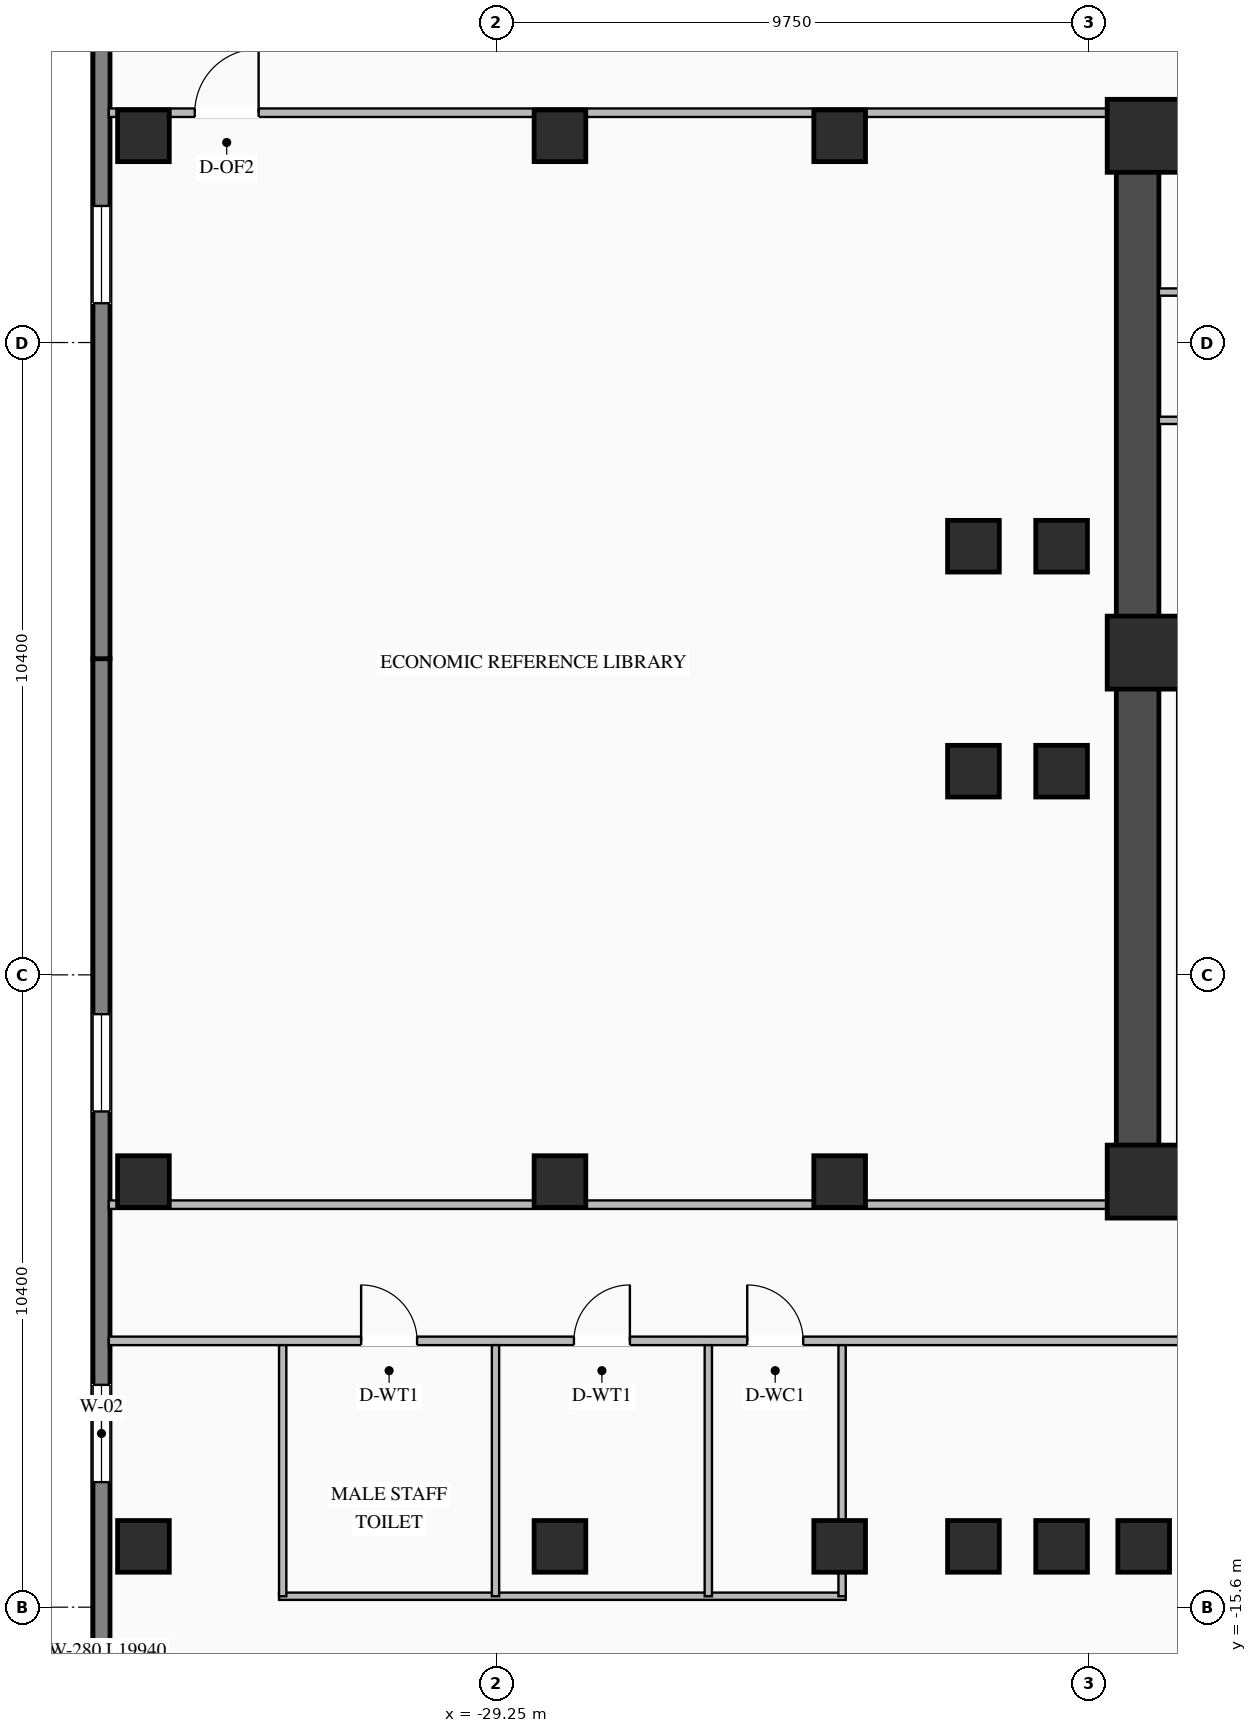
"""IFC4 building model, lengths in metres.
Left out: names, types, materials, properties, quantities, classifications, styles, units other than length and angle.
Written with IfcOpenShell. Run it as: python <this file> out.ifc"""

import sys

from ifc_helpers import new_model, si_unit, direction, frame, frame_2d, origin, origin_2d, place, context, subcontext, project, spatial, rectangle, i_section, extrude, element, fill, save


model = new_model("IFC4")
c1 = context("Model", 3, precision=1e-05, world=origin(), true_north=direction((0.0, 1.0)))
c2 = subcontext(c1, "Body", "Model", "MODEL_VIEW")
j1 = project(units=[si_unit("LENGTHUNIT", "METRE"), si_unit("PLANEANGLEUNIT", "RADIAN")], contexts=[c1])
p1 = place(None, origin())
s1 = spatial("IfcSite", under=j1, at=p1, CompositionType="ELEMENT")
p2 = place(p1, origin())
s2 = spatial("IfcBuilding", under=s1, at=p2, CompositionType="ELEMENT")
p3 = place(p2, frame((0.0, 0.0, 65.7)))
s3 = spatial("IfcBuildingStorey", under=s2, at=p3, CompositionType="ELEMENT", Elevation=65.7)
p4 = place(p3, frame((-19.05, -8.7, 0.0), z_axis=(0.0, 0.0, 1.0), x_axis=(1.0, 0.0, 0.0)))
e1 = element("IfcWall", 1, at=p4, inside=s3, PredefinedType="SHEAR", context=c2, shape_type="SweptSolid", body=[
    extrude(rectangle(XDim=10.25, YDim=0.7, at=frame_2d((5.125, 0.0))), origin(), (0.0, 0.0, 1.0), 4.02),
])
p5 = place(p3, frame((-19.05, 8.7, 0.0), z_axis=(0.0, 0.0, 1.0), x_axis=(1.0, 0.0, 0.0)))
e2 = element("IfcWall", 2, at=p5, inside=s3, PredefinedType="SHEAR", context=c2, shape_type="SweptSolid", body=[
    extrude(rectangle(XDim=10.25, YDim=0.7, at=frame_2d((5.125, 0.0))), origin(), (0.0, 0.0, 1.0), 4.02),
])
p6 = place(p5, frame((5.6, 0.0, 0.0)))
e3 = element("IfcOpeningElement", 3, at=p6, cuts=e2, PredefinedType="OPENING", context=c2, shape_type="SweptSolid", body=[
    extrude(rectangle(XDim=1.4, YDim=2.05, at=frame_2d((0.7, 1.025))), frame((0.0, 0.36, 0.0), z_axis=(0.0, -1.0, 0.0), x_axis=(1.0, 0.0, 0.0)), (0.0, 0.0, 1.0), 0.72),
])
p7 = place(p3, frame((-18.7, -8.35, 0.0), z_axis=(0.0, 0.0, 1.0), x_axis=(0.0, 1.0, 0.0)))
e4 = element("IfcWall", 4, at=p7, inside=s3, PredefinedType="SHEAR", context=c2, shape_type="SweptSolid", body=[
    extrude(rectangle(XDim=16.7, YDim=0.7, at=frame_2d((8.35, 0.0))), origin(), (0.0, 0.0, 1.0), 4.02),
])
for number, where, z_axis, x_axis in (
    (5, (-18.6, -8.6, 0.0), (0.0, 0.0, 1.0), (1.0, 0.0, 0.0)),
    (6, (-18.6, 0.1, 0.0), (0.0, 0.0, 1.0), (1.0, 0.0, 0.0)),
    (7, (-18.6, 8.6, 0.0), (0.0, 0.0, 1.0), (1.0, 0.0, 0.0)),
):
    element("IfcColumn", number, at=place(p3, frame(where, z_axis=z_axis, x_axis=x_axis)), inside=s3, PredefinedType="COLUMN", context=c2, shape_type="SweptSolid", body=[
        extrude(rectangle(XDim=1.2, YDim=1.2, at=origin_2d()), origin(), (0.0, 0.0, 1.0), 4.3),
    ])
for number, where, z_axis, x_axis in (
    (8, (-21.4, -14.6, 0.0), (0.0, 0.0, 1.0), (1.0, 0.0, 0.0)),
    (9, (-19.95, -14.6, 0.0), (0.0, 0.0, 1.0), (1.0, 0.0, 0.0)),
    (10, (-18.6, -14.6, 0.0), (0.0, 0.0, 1.0), (1.0, 0.0, 0.0)),
    (11, (-21.4, -1.85, 0.0), (0.0, 0.0, 1.0), (1.0, 0.0, 0.0)),
    (12, (-21.4, 1.85, 0.0), (0.0, 0.0, 1.0), (1.0, 0.0, 0.0)),
    (13, (-19.95, -1.85, 0.0), (0.0, 0.0, 1.0), (1.0, 0.0, 0.0)),
    (14, (-19.95, 1.85, 0.0), (0.0, 0.0, 1.0), (1.0, 0.0, 0.0)),
    (15, (-23.6, -14.6, 0.0), (0.0, 0.0, 1.0), (1.0, 0.0, 0.0)),
    (16, (-23.6, -8.6, 0.0), (0.0, 0.0, 1.0), (1.0, 0.0, 0.0)),
    (17, (-23.6, 8.6, 0.0), (0.0, 0.0, 1.0), (1.0, 0.0, 0.0)),
    (18, (-28.2, -14.6, 0.0), (0.0, 0.0, 1.0), (1.0, 0.0, 0.0)),
    (19, (-28.2, -8.6, 0.0), (0.0, 0.0, 1.0), (1.0, 0.0, 0.0)),
    (20, (-28.2, 8.6, 0.0), (0.0, 0.0, 1.0), (1.0, 0.0, 0.0)),
    (21, (-35.05, -14.6, 0.0), (0.0, 0.0, 1.0), (1.0, 0.0, 0.0)),
    (22, (-35.05, -8.6, 0.0), (0.0, 0.0, 1.0), (1.0, 0.0, 0.0)),
    (23, (-35.05, 8.6, 0.0), (0.0, 0.0, 1.0), (1.0, 0.0, 0.0)),
):
    element("IfcColumn", number, at=place(p3, frame(where, z_axis=z_axis, x_axis=x_axis)), inside=s3, PredefinedType="COLUMN", context=c2, shape_type="SweptSolid", body=[
        extrude(i_section(OverallWidth=0.85, OverallDepth=0.85, WebThickness=0.032, FlangeThickness=0.048, at=origin_2d()), origin(), (0.0, 0.0, 1.0), 4.3),
    ])
p8 = place(p3, frame((-35.74, -19.94, 0.0), z_axis=(0.0, 0.0, 1.0), x_axis=(0.0, 1.0, 0.0)))
e24 = element("IfcWall", 24, at=p8, inside=s3, PredefinedType="STANDARD", context=c2, shape_type="SweptSolid", body=[
    extrude(rectangle(XDim=19.94, YDim=0.28, at=frame_2d((9.97, 0.0))), origin(), (0.0, 0.0, 1.0), 4.0),
])
p9 = place(p8, frame((6.397, 0.0, 0.76)))
e25 = element("IfcOpeningElement", 25, at=p9, cuts=e24, PredefinedType="OPENING", context=c2, shape_type="SweptSolid", body=[
    extrude(rectangle(XDim=1.6, YDim=1.95, at=frame_2d((0.8, 0.975))), frame((0.0, 0.15, 0.0), z_axis=(0.0, -1.0, 0.0), x_axis=(1.0, 0.0, 0.0)), (0.0, 0.0, 1.0), 0.3),
])
p10 = place(p8, frame((12.493, 0.0, 0.76)))
e26 = element("IfcOpeningElement", 26, at=p10, cuts=e24, PredefinedType="OPENING", context=c2, shape_type="SweptSolid", body=[
    extrude(rectangle(XDim=1.6, YDim=1.95, at=frame_2d((0.8, 0.975))), frame((0.0, 0.15, 0.0), z_axis=(0.0, -1.0, 0.0), x_axis=(1.0, 0.0, 0.0)), (0.0, 0.0, 1.0), 0.3),
])
p11 = place(p3, frame((-35.74, 0.0, 0.0), z_axis=(0.0, 0.0, 1.0), x_axis=(0.0, 1.0, 0.0)))
e27 = element("IfcWall", 27, at=p11, inside=s3, PredefinedType="STANDARD", context=c2, shape_type="SweptSolid", body=[
    extrude(rectangle(XDim=19.94, YDim=0.28, at=frame_2d((9.97, 0.0))), origin(), (0.0, 0.0, 1.0), 4.0),
])
p12 = place(p11, frame((5.847, 0.0, 0.76)))
e28 = element("IfcOpeningElement", 28, at=p12, cuts=e27, PredefinedType="OPENING", context=c2, shape_type="SweptSolid", body=[
    extrude(rectangle(XDim=1.6, YDim=1.95, at=frame_2d((0.8, 0.975))), frame((0.0, 0.15, 0.0), z_axis=(0.0, -1.0, 0.0), x_axis=(1.0, 0.0, 0.0)), (0.0, 0.0, 1.0), 0.3),
])
p13 = place(p11, frame((11.943, 0.0, 0.76)))
e29 = element("IfcOpeningElement", 29, at=p13, cuts=e27, PredefinedType="OPENING", context=c2, shape_type="SweptSolid", body=[
    extrude(rectangle(XDim=1.6, YDim=1.95, at=frame_2d((0.8, 0.975))), frame((0.0, 0.15, 0.0), z_axis=(0.0, -1.0, 0.0), x_axis=(1.0, 0.0, 0.0)), (0.0, 0.0, 1.0), 0.3),
])
p14 = place(p3, frame((-18.35, 3.92, 0.0), z_axis=(0.0, 0.0, 1.0), x_axis=(1.0, 0.0, 0.0)))
e30 = element("IfcWall", 30, at=p14, inside=s3, PredefinedType="STANDARD", context=c2, shape_type="SweptSolid", body=[
    extrude(rectangle(XDim=4.45, YDim=0.12, at=frame_2d((2.225, 0.0))), origin(), (0.0, 0.0, 1.0), 4.0),
])
p15 = place(p3, frame((-18.35, 6.03, 0.0), z_axis=(0.0, 0.0, 1.0), x_axis=(1.0, 0.0, 0.0)))
e31 = element("IfcWall", 31, at=p15, inside=s3, PredefinedType="STANDARD", context=c2, shape_type="SweptSolid", body=[
    extrude(rectangle(XDim=2.2, YDim=0.12, at=frame_2d((1.1, 0.0))), origin(), (0.0, 0.0, 1.0), 4.0),
])
p16 = place(p3, frame((-35.62, -11.22, 0.0), z_axis=(0.0, 0.0, 1.0), x_axis=(1.0, 0.0, 0.0)))
e32 = element("IfcWall", 32, at=p16, inside=s3, PredefinedType="STANDARD", context=c2, shape_type="SweptSolid", body=[
    extrude(rectangle(XDim=71.24, YDim=0.14, at=frame_2d((35.62, 0.0))), origin(), (0.0, 0.0, 1.0), 3.495),
])
p17 = place(p16, frame((4.15, 0.0, 0.0)))
e33 = element("IfcOpeningElement", 33, at=p17, cuts=e32, PredefinedType="OPENING", context=c2, shape_type="SweptSolid", body=[
    extrude(rectangle(XDim=0.92, YDim=2.08, at=frame_2d((0.46, 1.04))), frame((0.0, 0.08, 0.0), z_axis=(0.0, -1.0, 0.0), x_axis=(1.0, 0.0, 0.0)), (0.0, 0.0, 1.0), 0.16),
])
p18 = place(p16, frame((7.65, 0.0, 0.0)))
e34 = element("IfcOpeningElement", 34, at=p18, cuts=e32, PredefinedType="OPENING", context=c2, shape_type="SweptSolid", body=[
    extrude(rectangle(XDim=0.92, YDim=2.08, at=frame_2d((0.46, 1.04))), frame((0.0, 0.08, 0.0), z_axis=(0.0, -1.0, 0.0), x_axis=(1.0, 0.0, 0.0)), (0.0, 0.0, 1.0), 0.16),
])
p19 = place(p16, frame((10.5, 0.0, 0.0)))
e35 = element("IfcOpeningElement", 35, at=p19, cuts=e32, PredefinedType="OPENING", context=c2, shape_type="SweptSolid", body=[
    extrude(rectangle(XDim=0.92, YDim=2.08, at=frame_2d((0.46, 1.04))), frame((0.0, 0.08, 0.0), z_axis=(0.0, -1.0, 0.0), x_axis=(1.0, 0.0, 0.0)), (0.0, 0.0, 1.0), 0.16),
])
p20 = place(p16, frame((25.749, 0.0, 0.0)))
e36 = element("IfcOpeningElement", 36, at=p20, cuts=e32, PredefinedType="OPENING", context=c2, shape_type="SweptSolid", body=[
    extrude(rectangle(XDim=1.0, YDim=2.08, at=frame_2d((0.5, 1.04))), frame((0.0, 0.08, 0.0), z_axis=(0.0, -1.0, 0.0), x_axis=(1.0, 0.0, 0.0)), (0.0, 0.0, 1.0), 0.16),
])
p21 = place(p16, frame((55.213, 0.0, 0.0)))
e37 = element("IfcOpeningElement", 37, at=p21, cuts=e32, PredefinedType="OPENING", context=c2, shape_type="SweptSolid", body=[
    extrude(rectangle(XDim=1.0, YDim=2.08, at=frame_2d((0.5, 1.04))), frame((0.0, 0.08, 0.0), z_axis=(0.0, -1.0, 0.0), x_axis=(1.0, 0.0, 0.0)), (0.0, 0.0, 1.0), 0.16),
])
p22 = place(p3, frame((-32.82, -15.42, 0.0), z_axis=(0.0, 0.0, 1.0), x_axis=(1.0, 0.0, 0.0)))
e38 = element("IfcWall", 38, at=p22, inside=s3, PredefinedType="STANDARD", context=c2, shape_type="SweptSolid", body=[
    extrude(rectangle(XDim=9.32, YDim=0.12, at=frame_2d((4.66, 0.0))), origin(), (0.0, 0.0, 1.0), 4.0),
])
for number, where, z_axis, x_axis in (
    (39, (-32.76, -15.42, 0.0), (0.0, 0.0, 1.0), (0.0, 1.0, 0.0)),
    (40, (-29.26, -15.42, 0.0), (0.0, 0.0, 1.0), (0.0, 1.0, 0.0)),
    (41, (-25.76, -15.42, 0.0), (0.0, 0.0, 1.0), (0.0, 1.0, 0.0)),
):
    element("IfcWall", number, at=place(p3, frame(where, z_axis=z_axis, x_axis=x_axis)), inside=s3, PredefinedType="STANDARD", context=c2, shape_type="SweptSolid", body=[
        extrude(rectangle(XDim=4.13, YDim=0.12, at=frame_2d((2.065, 0.0))), origin(), (0.0, 0.0, 1.0), 4.0),
    ])
p23 = place(p3, frame((-23.56, -15.42, 0.0), z_axis=(0.0, 0.0, 1.0), x_axis=(0.0, 1.0, 0.0)))
e42 = element("IfcWall", 42, at=p23, inside=s3, PredefinedType="STANDARD", context=c2, shape_type="SweptSolid", body=[
    extrude(rectangle(XDim=4.13, YDim=0.12, at=frame_2d((2.065, 0.0))), origin(), (0.0, 0.0, 1.0), 3.395),
])
p24 = place(p3, frame((-35.62, 8.98, 0.0), z_axis=(0.0, 0.0, 1.0), x_axis=(1.0, 0.0, 0.0)))
e43 = element("IfcWall", 43, at=p24, inside=s3, PredefinedType="STANDARD", context=c2, shape_type="SweptSolid", body=[
    extrude(rectangle(XDim=16.57, YDim=0.14, at=frame_2d((8.285, 0.0))), origin(), (0.0, 0.0, 1.0), 4.0),
])
p25 = place(p24, frame((1.414, 0.0, 0.0)))
e44 = element("IfcOpeningElement", 44, at=p25, cuts=e43, PredefinedType="OPENING", context=c2, shape_type="SweptSolid", body=[
    extrude(rectangle(XDim=1.05, YDim=2.08, at=frame_2d((0.525, 1.04))), frame((0.0, 0.08, 0.0), z_axis=(0.0, -1.0, 0.0), x_axis=(1.0, 0.0, 0.0)), (0.0, 0.0, 1.0), 0.16),
])
p26 = place(p3, frame((-35.62, -8.98, 0.0), z_axis=(0.0, 0.0, 1.0), x_axis=(1.0, 0.0, 0.0)))
e45 = element("IfcWall", 45, at=p26, inside=s3, PredefinedType="STANDARD", context=c2, shape_type="SweptSolid", body=[
    extrude(rectangle(XDim=16.57, YDim=0.14, at=frame_2d((8.285, 0.0))), origin(), (0.0, 0.0, 1.0), 4.0),
])
p27 = place(p9, origin())
e46 = element("IfcWindow", 46, at=p27, inside=s3, PartitioningType="SINGLE_PANEL", PredefinedType="WINDOW", context=c2, shape_type="SweptSolid", body=[
    extrude(rectangle(XDim=1.6, YDim=1.95, at=frame_2d((0.8, 0.975))), frame((0.0, 0.03, 0.0), z_axis=(0.0, -1.0, 0.0), x_axis=(1.0, 0.0, 0.0)), (0.0, 0.0, 1.0), 0.06),
])
fill(e25, e46)
p28 = place(p10, origin())
e47 = element("IfcWindow", 47, at=p28, inside=s3, PartitioningType="SINGLE_PANEL", PredefinedType="WINDOW", context=c2, shape_type="SweptSolid", body=[
    extrude(rectangle(XDim=1.6, YDim=1.95, at=frame_2d((0.8, 0.975))), frame((0.0, 0.03, 0.0), z_axis=(0.0, -1.0, 0.0), x_axis=(1.0, 0.0, 0.0)), (0.0, 0.0, 1.0), 0.06),
])
fill(e26, e47)
p29 = place(p12, origin())
e48 = element("IfcWindow", 48, at=p29, inside=s3, PartitioningType="SINGLE_PANEL", PredefinedType="WINDOW", context=c2, shape_type="SweptSolid", body=[
    extrude(rectangle(XDim=1.6, YDim=1.95, at=frame_2d((0.8, 0.975))), frame((0.0, 0.03, 0.0), z_axis=(0.0, -1.0, 0.0), x_axis=(1.0, 0.0, 0.0)), (0.0, 0.0, 1.0), 0.06),
])
fill(e28, e48)
p30 = place(p17, origin())
e49 = element("IfcDoor", 49, at=p30, inside=s3, OperationType="SINGLE_SWING_LEFT", PredefinedType="DOOR", context=c2, shape_type="SweptSolid", body=[
    extrude(rectangle(XDim=0.92, YDim=2.08, at=frame_2d((0.46, 1.04))), frame((0.0, 0.025, 0.0), z_axis=(0.0, -1.0, 0.0), x_axis=(1.0, 0.0, 0.0)), (0.0, 0.0, 1.0), 0.05),
])
fill(e33, e49)
p31 = place(p18, origin())
e50 = element("IfcDoor", 50, at=p31, inside=s3, OperationType="SINGLE_SWING_RIGHT", PredefinedType="DOOR", context=c2, shape_type="SweptSolid", body=[
    extrude(rectangle(XDim=0.92, YDim=2.08, at=frame_2d((0.46, 1.04))), frame((0.0, 0.025, 0.0), z_axis=(0.0, -1.0, 0.0), x_axis=(1.0, 0.0, 0.0)), (0.0, 0.0, 1.0), 0.05),
])
fill(e34, e50)
p32 = place(p19, origin())
e51 = element("IfcDoor", 51, at=p32, inside=s3, OperationType="SINGLE_SWING_LEFT", PredefinedType="DOOR", context=c2, shape_type="SweptSolid", body=[
    extrude(rectangle(XDim=0.92, YDim=2.08, at=frame_2d((0.46, 1.04))), frame((0.0, 0.025, 0.0), z_axis=(0.0, -1.0, 0.0), x_axis=(1.0, 0.0, 0.0)), (0.0, 0.0, 1.0), 0.05),
])
fill(e35, e51)
p33 = place(p25, origin())
e52 = element("IfcDoor", 52, at=p33, inside=s3, OperationType="SINGLE_SWING_RIGHT", PredefinedType="DOOR", context=c2, shape_type="SweptSolid", body=[
    extrude(rectangle(XDim=1.05, YDim=2.08, at=frame_2d((0.525, 1.04))), frame((0.0, 0.025, 0.0), z_axis=(0.0, -1.0, 0.0), x_axis=(1.0, 0.0, 0.0)), (0.0, 0.0, 1.0), 0.05),
])
fill(e44, e52)
save(model, sys.argv[1])
